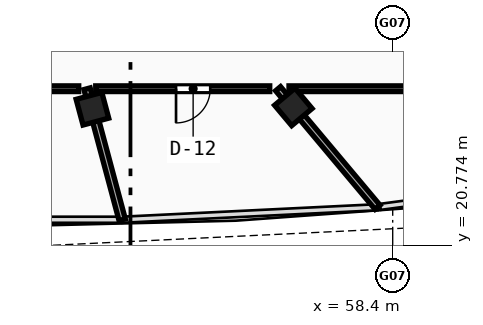
"""IFC4 building model, lengths in metres.
Left out: names, types, materials, properties, quantities, classifications, styles, units other than length and angle.
Written with IfcOpenShell. Run it as: python <this file> out.ifc"""

import sys

from ifc_helpers import new_model, si_unit, direction, frame, frame_2d, origin, origin_with_axes, origin_2d, place, context, subcontext, project, spatial, rectangle, hollow_rectangle, extrude, source, transform, mapped, element, fill, save


model = new_model("IFC4")
c1 = context("Model", 3, precision=1e-05, world=origin(), true_north=direction((0.0, 1.0)))
c2 = subcontext(c1, "Body", "Model", "MODEL_VIEW")
j1 = project(units=[si_unit("LENGTHUNIT", "METRE"), si_unit("PLANEANGLEUNIT", "RADIAN")], contexts=[c1])
p1 = place(None, origin())
s1 = spatial("IfcSite", under=j1, at=p1, CompositionType="ELEMENT")
p2 = place(p1, origin())
s2 = spatial("IfcBuilding", under=s1, at=p2, CompositionType="ELEMENT")
p3 = place(p2, frame((0.0, 0.0, 336.76)))
s3 = spatial("IfcBuildingStorey", under=s2, at=p3, CompositionType="ELEMENT", Elevation=336.76)
m1 = source(origin(), c2, "Body", "SweptSolid", [
    extrude(hollow_rectangle(XDim=0.7, YDim=0.7, WallThickness=0.026, at=origin_2d()), origin(), (0.0, 0.0, 1.0), 3.75),
])
for number, where, z_axis, x_axis in (
    (1, (50.499, 24.373, -0.26), (0.0, 0.0, 1.0), (0.966, 0.259, 0.0)),
    (2, (55.785, 24.422, -0.26), (0.0, 0.0, 1.0), (0.766, 0.643, 0.0)),
):
    element("IfcColumn", number, at=place(p3, frame(where, z_axis=z_axis, x_axis=x_axis)), inside=s3, PredefinedType="COLUMN", context=c2, shape_type="MappedRepresentation", body=[
        mapped(m1, transform((0.0, 0.0, 0.0), scale=1.0)),
    ])
p4 = place(p3, frame((50.358, 24.9, 0.0), z_axis=(0.0, 0.0, 1.0), x_axis=(0.258837518281, -0.965920876227, 0.0)))
e3 = element("IfcWall", 3, at=p4, inside=s3, PredefinedType="PARTITIONING", context=c2, shape_type="SweptSolid", body=[
    extrude(rectangle(XDim=3.569, YDim=0.17, at=frame_2d((1.785, 0.0))), origin(), (0.0, 0.0, 1.0), 2.89),
])
p5 = place(p3, frame((55.384, 24.9, 0.0), z_axis=(0.0, 0.0, 1.0), x_axis=(0.642829150269, -0.766009584512, 0.0)))
e4 = element("IfcWall", 4, at=p5, inside=s3, PredefinedType="PARTITIONING", context=c2, shape_type="SweptSolid", body=[
    extrude(rectangle(XDim=4.071, YDim=0.17, at=frame_2d((2.036, 0.0))), origin(), (0.0, 0.0, 1.0), 2.89),
])
p6 = place(p3, frame((62.85, 24.9, 0.0), z_axis=(0.0, 0.0, 1.0), x_axis=(-1.0, 0.0, 0.0)))
e5 = element("IfcWall", 5, at=p6, inside=s3, PredefinedType="PARTITIONING", context=c2, shape_type="SweptSolid", body=[
    extrude(rectangle(XDim=7.179, YDim=0.15, at=frame_2d((3.589, 0.0))), origin(), (0.0, 0.0, 1.0), 2.89),
])
p7 = place(p3, frame((55.164, 24.9, 0.0), z_axis=(0.0, 0.0, 1.0), x_axis=(-1.0, 0.0, 0.0)))
e6 = element("IfcWall", 6, at=p7, inside=s3, PredefinedType="PARTITIONING", context=c2, shape_type="SweptSolid", body=[
    extrude(rectangle(XDim=4.579, YDim=0.15, at=frame_2d((2.289, 0.0))), origin(), (0.0, 0.0, 1.0), 3.49),
])
p8 = place(p7, frame((1.565, 0.0, 0.0)))
e7 = element("IfcOpeningElement", 7, at=p8, cuts=e6, PredefinedType="OPENING", context=c2, shape_type="SweptSolid", body=[
    extrude(rectangle(XDim=0.9, YDim=2.08, at=frame_2d((0.45, 1.04))), frame((0.0, 0.085, 0.0), z_axis=(0.0, -1.0, 0.0), x_axis=(1.0, 0.0, 0.0)), (0.0, 0.0, 1.0), 0.17),
])
p9 = place(p3, frame((50.138, 24.9, 0.0), z_axis=(0.0, 0.0, 1.0), x_axis=(-1.0, 0.0, 0.0)))
e8 = element("IfcWall", 8, at=p9, inside=s3, PredefinedType="PARTITIONING", context=c2, shape_type="SweptSolid", body=[
    extrude(rectangle(XDim=1.918, YDim=0.15, at=frame_2d((0.959, 0.0))), origin(), (0.0, 0.0, 1.0), 3.49),
])
m2 = source(origin(), c2, "Body", "SweptSolid", [
    extrude(rectangle(XDim=0.9, YDim=2.08, at=frame_2d((0.45, 1.04))), frame((0.0, 0.025, 0.0), z_axis=(0.0, -1.0, 0.0), x_axis=(1.0, 0.0, 0.0)), (0.0, 0.0, 1.0), 0.05),
])
p10 = place(p8, origin_with_axes())
e9 = element("IfcDoor", 9, at=p10, inside=s3, OperationType="SINGLE_SWING_RIGHT", PredefinedType="DOOR", context=c2, shape_type="MappedRepresentation", body=[
    mapped(m2, transform((0.0, 0.0, 0.0), scale=1.0)),
])
fill(e7, e9)
save(model, sys.argv[1])
